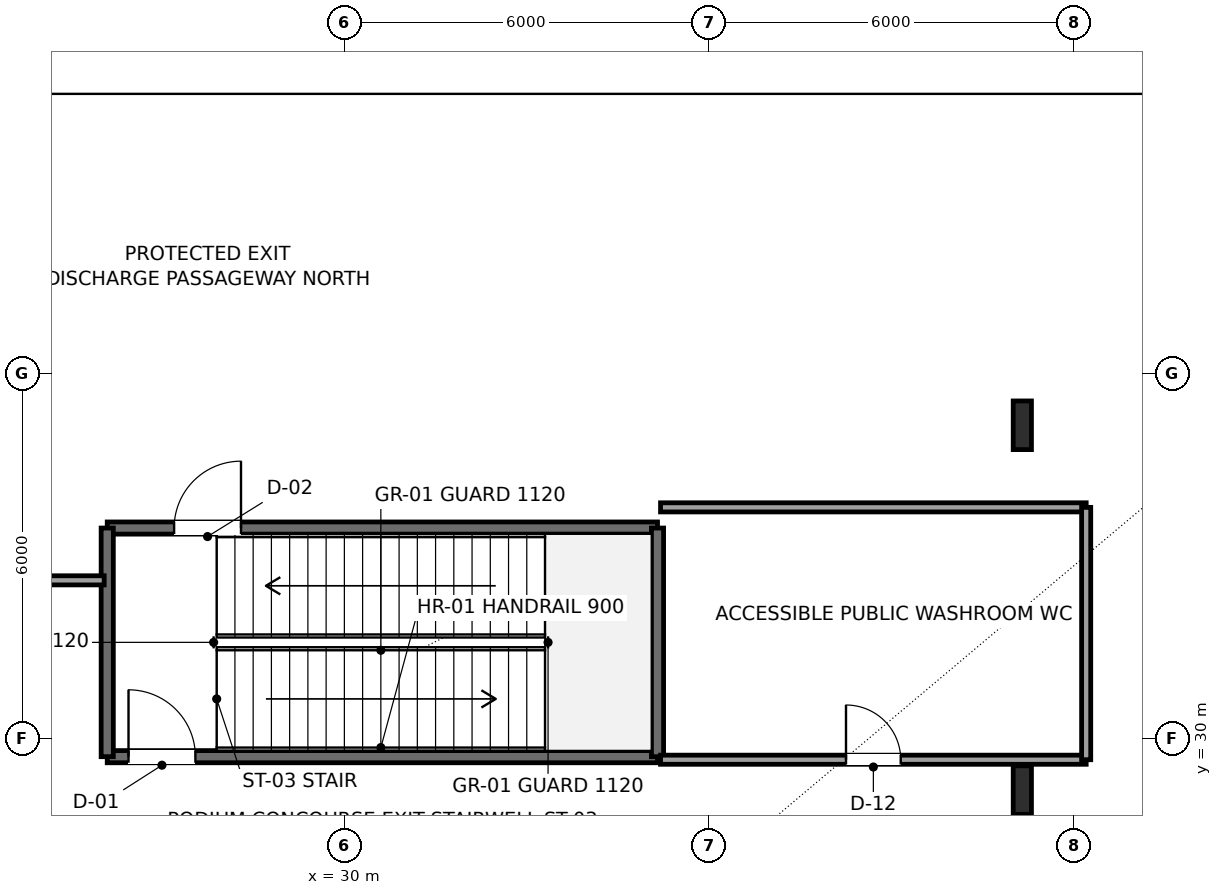
"""IFC4 building model, lengths in metres.
Left out: names, types, materials, properties, quantities, classifications, styles, units other than length and angle.
Written with IfcOpenShell. Run it as: python <this file> out.ifc"""

import sys

from ifc_helpers import new_model, si_unit, direction, frame, frame_2d, origin, origin_2d, place, context, subcontext, project, spatial, rectangle, i_section, extrude, element, fill, save


model = new_model("IFC4")
c1 = context("Model", 3, precision=1e-05, world=origin(), true_north=direction((0.0, 1.0)))
c2 = subcontext(c1, "Body", "Model", "MODEL_VIEW")
j1 = project(units=[si_unit("LENGTHUNIT", "METRE"), si_unit("PLANEANGLEUNIT", "RADIAN")], contexts=[c1])
p1 = place(None, origin())
s1 = spatial("IfcSite", under=j1, at=p1, CompositionType="ELEMENT")
p2 = place(p1, origin())
s2 = spatial("IfcBuilding", under=s1, at=p2, CompositionType="ELEMENT")
p3 = place(p2, origin())
s3 = spatial("IfcBuildingStorey", under=s2, at=p3, CompositionType="ELEMENT", Elevation=0.0)
for number, where, z_axis, x_axis in (
    (1, (41.15, 29.15, 0.0), (0.0, 0.0, 1.0), (1.0, 0.0, 0.0)),
    (2, (41.15, 35.15, 0.0), (0.0, 0.0, 1.0), (1.0, 0.0, 0.0)),
):
    element("IfcColumn", number, at=place(p3, frame(where, z_axis=z_axis, x_axis=x_axis)), inside=s3, PredefinedType="COLUMN", context=c2, shape_type="SweptSolid", body=[
        extrude(i_section(OverallWidth=0.3, OverallDepth=0.8, WebThickness=0.018, FlangeThickness=0.033, FilletRadius=0.03, at=origin_2d()), origin(), (0.0, 0.0, 1.0), 5.7),
    ])
p4 = place(p3, frame((26.1, 29.7, 0.0), z_axis=(0.0, 0.0, 1.0), x_axis=(1.0, 0.0, 0.0)))
e3 = element("IfcWall", 3, at=p4, inside=s3, PredefinedType="SHEAR", context=c2, shape_type="SweptSolid", body=[
    extrude(rectangle(XDim=9.05, YDim=0.2, at=frame_2d((4.525, 0.0))), origin(), (0.0, 0.0, 1.0), 5.4),
])
p5 = place(p4, frame((0.35, 0.0, 0.0)))
e4 = element("IfcOpeningElement", 4, at=p5, cuts=e3, PredefinedType="OPENING", context=c2, shape_type="SweptSolid", body=[
    extrude(rectangle(XDim=1.1, YDim=2.2, at=frame_2d((0.55, 1.1))), frame((0.0, 0.11, 0.0), z_axis=(0.0, -1.0, 0.0), x_axis=(1.0, 0.0, 0.0)), (0.0, 0.0, 1.0), 0.22),
])
p6 = place(p3, frame((26.1, 33.46, 0.0), z_axis=(0.0, 0.0, 1.0), x_axis=(1.0, 0.0, 0.0)))
e5 = element("IfcWall", 5, at=p6, inside=s3, PredefinedType="SHEAR", context=c2, shape_type="SweptSolid", body=[
    extrude(rectangle(XDim=9.05, YDim=0.2, at=frame_2d((4.525, 0.0))), origin(), (0.0, 0.0, 1.0), 5.4),
])
p7 = place(p6, frame((1.1, 0.0, 0.0)))
e6 = element("IfcOpeningElement", 6, at=p7, cuts=e5, PredefinedType="OPENING", context=c2, shape_type="SweptSolid", body=[
    extrude(rectangle(XDim=1.1, YDim=2.2, at=frame_2d((0.55, 1.1))), frame((0.0, 0.11, 0.0), z_axis=(0.0, -1.0, 0.0), x_axis=(1.0, 0.0, 0.0)), (0.0, 0.0, 1.0), 0.22),
])
for number, where, z_axis, x_axis in (
    (7, (26.1, 29.7, 0.0), (0.0, 0.0, 1.0), (0.0, 1.0, 0.0)),
    (8, (35.15, 29.7, 0.0), (0.0, 0.0, 1.0), (0.0, 1.0, 0.0)),
):
    element("IfcWall", number, at=place(p3, frame(where, z_axis=z_axis, x_axis=x_axis)), inside=s3, PredefinedType="SHEAR", context=c2, shape_type="SweptSolid", body=[
        extrude(rectangle(XDim=3.76, YDim=0.2, at=frame_2d((1.88, 0.0))), origin(), (0.0, 0.0, 1.0), 5.4),
    ])
p8 = place(p3, frame((20.5, 32.6, 0.0), z_axis=(0.0, 0.0, 1.0), x_axis=(1.0, 0.0, 0.0)))
e9 = element("IfcWall", 9, at=p8, inside=s3, PredefinedType="PARTITIONING", context=c2, shape_type="SweptSolid", body=[
    extrude(rectangle(XDim=5.55, YDim=0.15, at=frame_2d((2.775, 0.0))), origin(), (0.0, 0.0, 1.0), 5.4),
])
p9 = place(p3, frame((35.2, 29.65, 0.0), z_axis=(0.0, 0.0, 1.0), x_axis=(1.0, 0.0, 0.0)))
e10 = element("IfcWall", 10, at=p9, inside=s3, PredefinedType="PARTITIONING", context=c2, shape_type="SweptSolid", body=[
    extrude(rectangle(XDim=7.0, YDim=0.15, at=frame_2d((3.5, 0.0))), origin(), (0.0, 0.0, 1.0), 5.4),
])
p10 = place(p9, frame((3.05, 0.0, 0.0)))
e11 = element("IfcOpeningElement", 11, at=p10, cuts=e10, PredefinedType="OPENING", context=c2, shape_type="SweptSolid", body=[
    extrude(rectangle(XDim=0.9, YDim=2.1, at=frame_2d((0.45, 1.05))), frame((0.0, 0.085, 0.0), z_axis=(0.0, -1.0, 0.0), x_axis=(1.0, 0.0, 0.0)), (0.0, 0.0, 1.0), 0.17),
])
p11 = place(p3, frame((35.2, 33.8, 0.0), z_axis=(0.0, 0.0, 1.0), x_axis=(1.0, 0.0, 0.0)))
e12 = element("IfcWall", 12, at=p11, inside=s3, PredefinedType="PARTITIONING", context=c2, shape_type="SweptSolid", body=[
    extrude(rectangle(XDim=7.0, YDim=0.15, at=frame_2d((3.5, 0.0))), origin(), (0.0, 0.0, 1.0), 5.4),
])
p12 = place(p3, frame((42.2, 29.65, 0.0), z_axis=(0.0, 0.0, 1.0), x_axis=(0.0, 1.0, 0.0)))
e13 = element("IfcWall", 13, at=p12, inside=s3, PredefinedType="PARTITIONING", context=c2, shape_type="SweptSolid", body=[
    extrude(rectangle(XDim=4.15, YDim=0.15, at=frame_2d((2.075, 0.0))), origin(), (0.0, 0.0, 1.0), 5.4),
])
p13 = place(p5, origin())
e14 = element("IfcDoor", 14, at=p13, inside=s3, OperationType="SINGLE_SWING_LEFT", PredefinedType="DOOR", context=c2, shape_type="SweptSolid", body=[
    extrude(rectangle(XDim=1.1, YDim=2.2, at=frame_2d((0.55, 1.1))), frame((0.0, 0.025, 0.0), z_axis=(0.0, -1.0, 0.0), x_axis=(1.0, 0.0, 0.0)), (0.0, 0.0, 1.0), 0.05),
])
fill(e4, e14)
p14 = place(p7, origin())
e15 = element("IfcDoor", 15, at=p14, inside=s3, OperationType="SINGLE_SWING_RIGHT", PredefinedType="DOOR", context=c2, shape_type="SweptSolid", body=[
    extrude(rectangle(XDim=1.1, YDim=2.2, at=frame_2d((0.55, 1.1))), frame((0.0, 0.025, 0.0), z_axis=(0.0, -1.0, 0.0), x_axis=(1.0, 0.0, 0.0)), (0.0, 0.0, 1.0), 0.05),
])
fill(e6, e15)
p15 = place(p10, origin())
e16 = element("IfcDoor", 16, at=p15, inside=s3, OperationType="SINGLE_SWING_LEFT", PredefinedType="DOOR", context=c2, shape_type="SweptSolid", body=[
    extrude(rectangle(XDim=0.9, YDim=2.1, at=frame_2d((0.45, 1.05))), frame((0.0, 0.025, 0.0), z_axis=(0.0, -1.0, 0.0), x_axis=(1.0, 0.0, 0.0)), (0.0, 0.0, 1.0), 0.05),
])
fill(e11, e16)
save(model, sys.argv[1])
